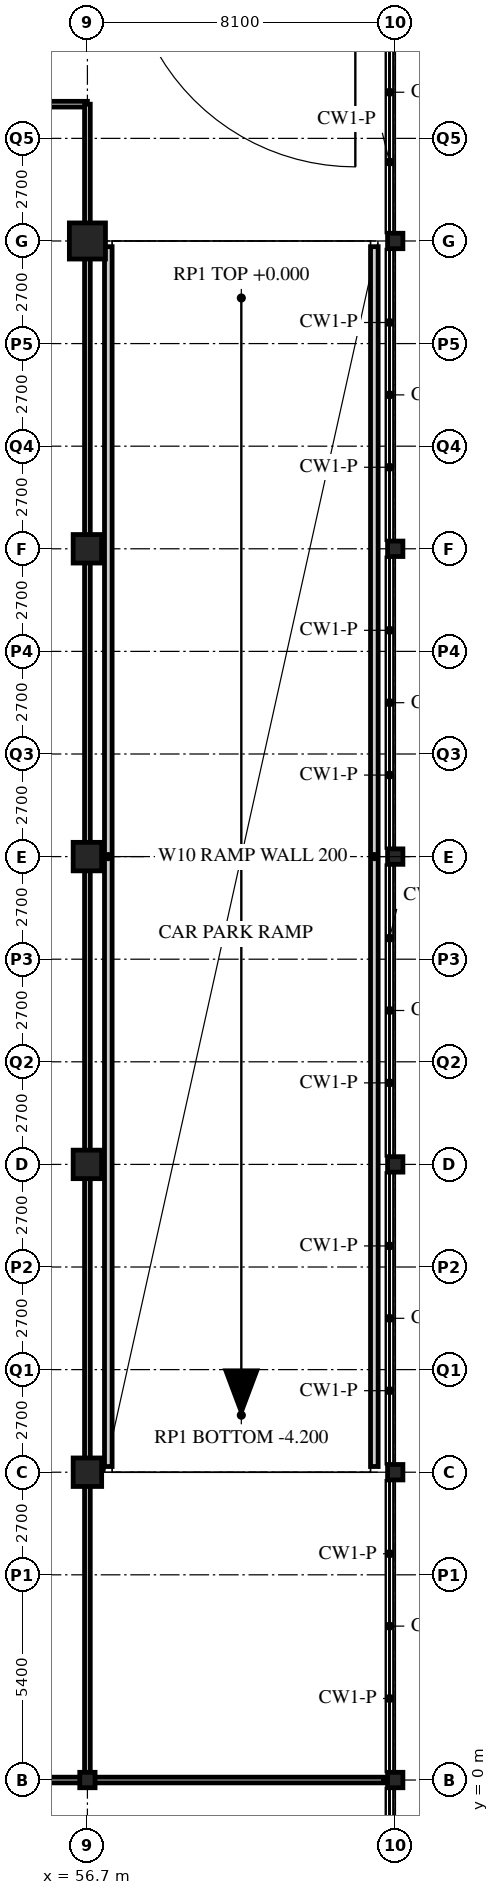
"""IFC4 building model, lengths in metres.
Left out: names, types, materials, properties, quantities, classifications, styles, units other than length and angle.
Written with IfcOpenShell. Run it as: python <this file> out.ifc"""

import sys

from ifc_helpers import new_model, si_unit, direction, frame, frame_2d, origin, origin_with_axes, origin_2d, place, context, subcontext, project, spatial, rectangle, hollow_rectangle, i_section, extrude, element, save


model = new_model("IFC4")
c1 = context("Model", 3, precision=1e-05, world=origin(), true_north=direction((0.0, 1.0)))
c2 = subcontext(c1, "Body", "Model", "MODEL_VIEW")
j1 = project(units=[si_unit("LENGTHUNIT", "METRE"), si_unit("PLANEANGLEUNIT", "RADIAN")], contexts=[c1])
p1 = place(None, origin())
s1 = spatial("IfcSite", under=j1, at=p1, CompositionType="ELEMENT")
p2 = place(p1, origin())
s2 = spatial("IfcBuilding", under=s1, at=p2, CompositionType="ELEMENT")
p3 = place(p2, origin())
s3 = spatial("IfcBuildingStorey", under=s2, at=p3, CompositionType="ELEMENT", Elevation=0.0)
p4 = place(p3, frame((56.7, 0.0, 0.0), z_axis=(0.0, 0.0, 1.0), x_axis=(1.0, 0.0, 0.0)))
e1 = element("IfcColumn", 1, at=p4, inside=s3, PredefinedType="COLUMN", context=c2, shape_type="SweptSolid", body=[
    extrude(i_section(OverallWidth=0.403, OverallDepth=0.406, WebThickness=0.027, FlangeThickness=0.043, FilletRadius=0.015, at=origin_2d()), origin(), (0.0, 0.0, 1.0), 6.0),
])
for number, where, z_axis, x_axis in (
    (2, (56.7, 8.1, 0.0), (0.0, 0.0, 1.0), (1.0, 0.0, 0.0)),
    (3, (56.7, 16.2, 0.0), (0.0, 0.0, 1.0), (1.0, 0.0, 0.0)),
    (4, (56.7, 24.3, 0.0), (0.0, 0.0, 1.0), (1.0, 0.0, 0.0)),
    (5, (56.7, 32.4, 0.0), (0.0, 0.0, 1.0), (1.0, 0.0, 0.0)),
):
    element("IfcColumn", number, at=place(p3, frame(where, z_axis=z_axis, x_axis=x_axis)), inside=s3, PredefinedType="COLUMN", context=c2, shape_type="SweptSolid", body=[
        extrude(hollow_rectangle(XDim=0.75, YDim=0.75, WallThickness=0.07, at=origin_2d()), origin(), (0.0, 0.0, 1.0), 6.0),
    ])
p5 = place(p3, frame((56.7, 40.5, 0.0), z_axis=(0.0, 0.0, 1.0), x_axis=(1.0, 0.0, 0.0)))
e6 = element("IfcColumn", 6, at=p5, inside=s3, PredefinedType="COLUMN", context=c2, shape_type="SweptSolid", body=[
    extrude(hollow_rectangle(XDim=0.95, YDim=0.95, WallThickness=0.1, at=origin_2d()), origin(), (0.0, 0.0, 1.0), 6.0),
])
for number, where, z_axis, x_axis in (
    (7, (64.8, 0.0, 0.0), (0.0, 0.0, 1.0), (1.0, 0.0, 0.0)),
    (8, (64.8, 8.1, 0.0), (0.0, 0.0, 1.0), (1.0, 0.0, 0.0)),
    (9, (64.8, 16.2, 0.0), (0.0, 0.0, 1.0), (1.0, 0.0, 0.0)),
    (10, (64.8, 24.3, 0.0), (0.0, 0.0, 1.0), (1.0, 0.0, 0.0)),
    (11, (64.8, 32.4, 0.0), (0.0, 0.0, 1.0), (1.0, 0.0, 0.0)),
    (12, (64.8, 40.5, 0.0), (0.0, 0.0, 1.0), (1.0, 0.0, 0.0)),
):
    element("IfcColumn", number, at=place(p3, frame(where, z_axis=z_axis, x_axis=x_axis)), inside=s3, PredefinedType="COLUMN", context=c2, shape_type="SweptSolid", body=[
        extrude(i_section(OverallWidth=0.403, OverallDepth=0.406, WebThickness=0.027, FlangeThickness=0.043, FilletRadius=0.015, at=origin_2d()), origin(), (0.0, 0.0, 1.0), 6.0),
    ])
p6 = place(p3, origin_with_axes())
e13 = element("IfcWall", 13, at=p6, inside=s3, PredefinedType="PARTITIONING", context=c2, shape_type="SweptSolid", body=[
    extrude(rectangle(XDim=56.7, YDim=0.15, at=frame_2d((28.35, 0.0))), origin(), (0.0, 0.0, 1.0), 5.138),
])
p7 = place(p6, frame((10.95, 0.0, 0.0)))
e14 = element("IfcOpeningElement", 14, at=p7, cuts=e13, PredefinedType="OPENING", context=c2, shape_type="SweptSolid", body=[
    extrude(rectangle(XDim=2.4, YDim=2.7, at=frame_2d((1.2, 1.35))), frame((0.0, 0.085, 0.0), z_axis=(0.0, -1.0, 0.0), x_axis=(1.0, 0.0, 0.0)), (0.0, 0.0, 1.0), 0.17),
])
p8 = place(p6, frame((19.35, 0.0, 0.0)))
e15 = element("IfcOpeningElement", 15, at=p8, cuts=e13, PredefinedType="OPENING", context=c2, shape_type="SweptSolid", body=[
    extrude(rectangle(XDim=1.8, YDim=2.4, at=frame_2d((0.9, 1.2))), frame((0.0, 0.085, 0.0), z_axis=(0.0, -1.0, 0.0), x_axis=(1.0, 0.0, 0.0)), (0.0, 0.0, 1.0), 0.17),
])
p9 = place(p6, frame((27.15, 0.0, 0.0)))
e16 = element("IfcOpeningElement", 16, at=p9, cuts=e13, PredefinedType="OPENING", context=c2, shape_type="SweptSolid", body=[
    extrude(rectangle(XDim=2.4, YDim=2.7, at=frame_2d((1.2, 1.35))), frame((0.0, 0.085, 0.0), z_axis=(0.0, -1.0, 0.0), x_axis=(1.0, 0.0, 0.0)), (0.0, 0.0, 1.0), 0.17),
])
p10 = place(p6, frame((35.55, 0.0, 0.0)))
e17 = element("IfcOpeningElement", 17, at=p10, cuts=e13, PredefinedType="OPENING", context=c2, shape_type="SweptSolid", body=[
    extrude(rectangle(XDim=1.8, YDim=2.4, at=frame_2d((0.9, 1.2))), frame((0.0, 0.085, 0.0), z_axis=(0.0, -1.0, 0.0), x_axis=(1.0, 0.0, 0.0)), (0.0, 0.0, 1.0), 0.17),
])
p11 = place(p6, frame((43.35, 0.0, 0.0)))
e18 = element("IfcOpeningElement", 18, at=p11, cuts=e13, PredefinedType="OPENING", context=c2, shape_type="SweptSolid", body=[
    extrude(rectangle(XDim=2.4, YDim=2.7, at=frame_2d((1.2, 1.35))), frame((0.0, 0.085, 0.0), z_axis=(0.0, -1.0, 0.0), x_axis=(1.0, 0.0, 0.0)), (0.0, 0.0, 1.0), 0.17),
])
p12 = place(p6, frame((2.85, 0.0, 0.0)))
e19 = element("IfcOpeningElement", 19, at=p12, cuts=e13, PredefinedType="OPENING", context=c2, shape_type="SweptSolid", body=[
    extrude(rectangle(XDim=2.4, YDim=2.7, at=frame_2d((1.2, 1.35))), frame((0.0, 0.085, 0.0), z_axis=(0.0, -1.0, 0.0), x_axis=(1.0, 0.0, 0.0)), (0.0, 0.0, 1.0), 0.17),
])
p13 = place(p6, frame((51.45, 0.0, 0.0)))
e20 = element("IfcOpeningElement", 20, at=p13, cuts=e13, PredefinedType="OPENING", context=c2, shape_type="SweptSolid", body=[
    extrude(rectangle(XDim=2.4, YDim=2.7, at=frame_2d((1.2, 1.35))), frame((0.0, 0.085, 0.0), z_axis=(0.0, -1.0, 0.0), x_axis=(1.0, 0.0, 0.0)), (0.0, 0.0, 1.0), 0.17),
])
p14 = place(p3, frame((0.0, 44.1, 0.0), z_axis=(0.0, 0.0, 1.0), x_axis=(1.0, 0.0, 0.0)))
e21 = element("IfcWall", 21, at=p14, inside=s3, PredefinedType="PARTITIONING", context=c2, shape_type="SweptSolid", body=[
    extrude(rectangle(XDim=56.7, YDim=0.15, at=frame_2d((28.35, 0.0))), origin(), (0.0, 0.0, 1.0), 5.75),
])
p15 = place(p14, frame((15.3, 0.0, 0.0)))
e22 = element("IfcOpeningElement", 22, at=p15, cuts=e21, PredefinedType="OPENING", context=c2, shape_type="SweptSolid", body=[
    extrude(rectangle(XDim=1.8, YDim=2.4, at=frame_2d((0.9, 1.2))), frame((0.0, 0.085, 0.0), z_axis=(0.0, -1.0, 0.0), x_axis=(1.0, 0.0, 0.0)), (0.0, 0.0, 1.0), 0.17),
])
p16 = place(p14, frame((27.45, 0.0, 0.0)))
e23 = element("IfcOpeningElement", 23, at=p16, cuts=e21, PredefinedType="OPENING", context=c2, shape_type="SweptSolid", body=[
    extrude(rectangle(XDim=1.8, YDim=2.4, at=frame_2d((0.9, 1.2))), frame((0.0, 0.085, 0.0), z_axis=(0.0, -1.0, 0.0), x_axis=(1.0, 0.0, 0.0)), (0.0, 0.0, 1.0), 0.17),
])
p17 = place(p14, frame((39.6, 0.0, 0.0)))
e24 = element("IfcOpeningElement", 24, at=p17, cuts=e21, PredefinedType="OPENING", context=c2, shape_type="SweptSolid", body=[
    extrude(rectangle(XDim=1.8, YDim=2.4, at=frame_2d((0.9, 1.2))), frame((0.0, 0.085, 0.0), z_axis=(0.0, -1.0, 0.0), x_axis=(1.0, 0.0, 0.0)), (0.0, 0.0, 1.0), 0.17),
])
p18 = place(p14, frame((4.85, 0.0, 0.0)))
e25 = element("IfcOpeningElement", 25, at=p18, cuts=e21, PredefinedType="OPENING", context=c2, shape_type="SweptSolid", body=[
    extrude(rectangle(XDim=2.4, YDim=2.7, at=frame_2d((1.2, 1.35))), frame((0.0, 0.085, 0.0), z_axis=(0.0, -1.0, 0.0), x_axis=(1.0, 0.0, 0.0)), (0.0, 0.0, 1.0), 0.17),
])
p19 = place(p3, frame((56.7, 0.0, 0.0), z_axis=(0.0, 0.0, 1.0), x_axis=(0.0, 1.0, 0.0)))
e26 = element("IfcWall", 26, at=p19, inside=s3, PredefinedType="PARTITIONING", context=c2, shape_type="SweptSolid", body=[
    extrude(rectangle(XDim=44.1, YDim=0.15, at=frame_2d((22.05, 0.0))), origin(), (0.0, 0.0, 1.0), 5.138),
])
p20 = place(p3, frame((56.7, 0.0, 0.0), z_axis=(0.0, 0.0, 1.0), x_axis=(1.0, 0.0, 0.0)))
e27 = element("IfcWall", 27, at=p20, inside=s3, PredefinedType="PARTITIONING", context=c2, shape_type="SweptSolid", body=[
    extrude(rectangle(XDim=7.8, YDim=0.15, at=frame_2d((3.9, 0.0))), origin(), (0.0, 0.0, 1.0), 5.138),
])
for number, where, z_axis, x_axis in (
    (28, (64.25, 8.25, 0.0), (0.0, 0.0, 1.0), (0.0, 1.0, 0.0)),
    (29, (57.25, 8.25, 0.0), (0.0, 0.0, 1.0), (0.0, 1.0, 0.0)),
):
    element("IfcWall", number, at=place(p3, frame(where, z_axis=z_axis, x_axis=x_axis)), inside=s3, PredefinedType="PARTITIONING", context=c2, shape_type="SweptSolid", body=[
        extrude(rectangle(XDim=32.1, YDim=0.2, at=frame_2d((16.05, 0.0))), origin(), (0.0, 0.0, 1.0), 1.1),
    ])
save(model, sys.argv[1])
